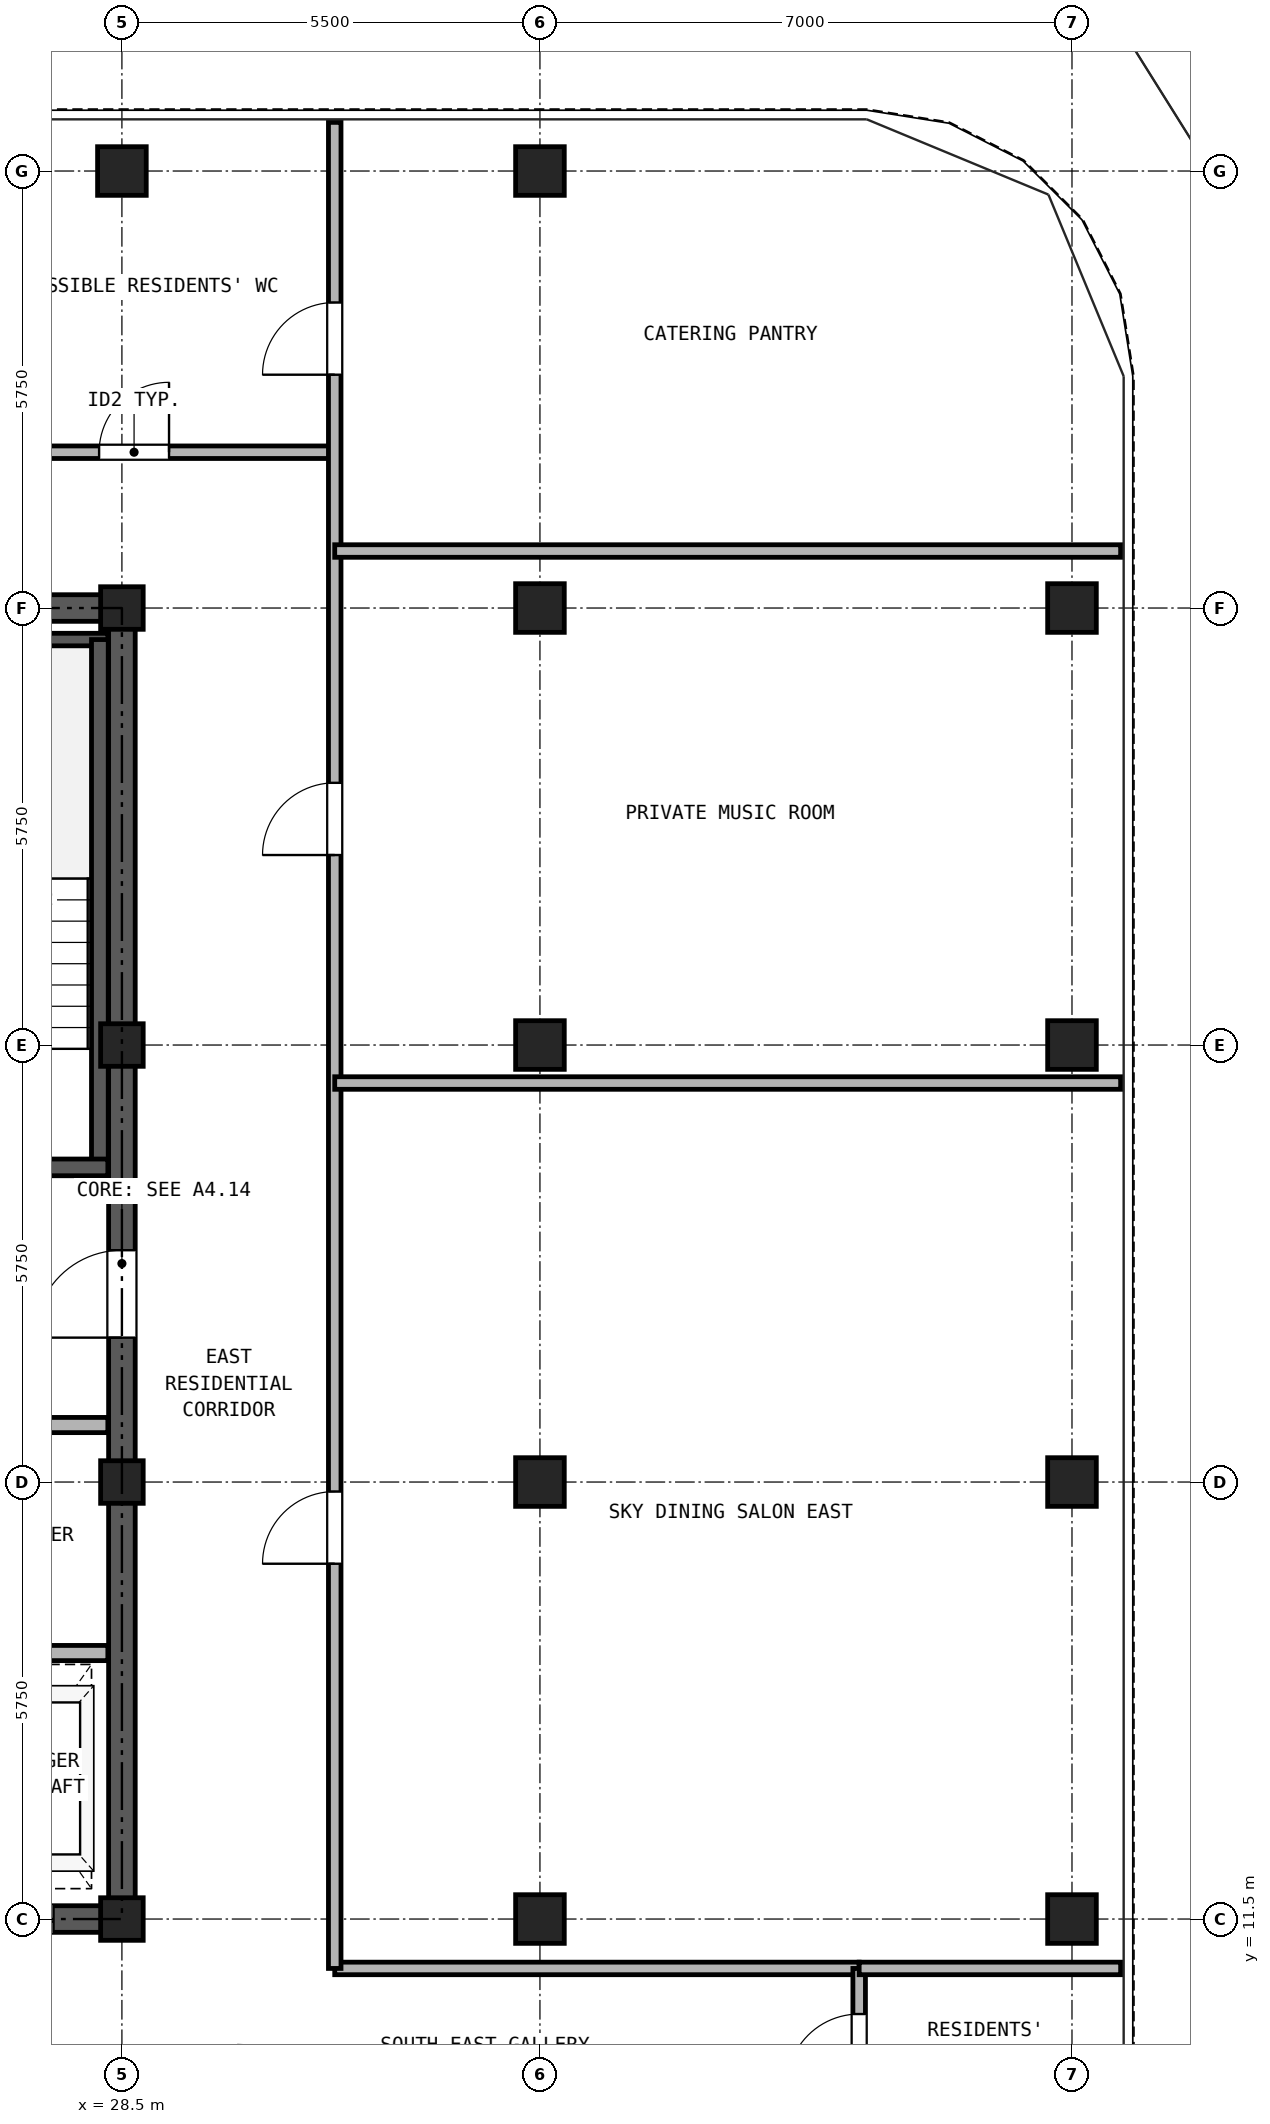
"""IFC4 building model, lengths in metres.
Left out: names, types, materials, properties, quantities, classifications, styles, units other than length and angle.
Written with IfcOpenShell. Run it as: python <this file> out.ifc"""

import sys

from ifc_helpers import new_model, si_unit, direction, frame, frame_2d, origin, origin_2d, place, context, subcontext, project, spatial, rectangle, hollow_rectangle, extrude, source, transform, mapped, element, fill, save


model = new_model("IFC4")
c1 = context("Model", 3, precision=1e-05, world=origin(), true_north=direction((0.0, 1.0)))
c2 = subcontext(c1, "Body", "Model", "MODEL_VIEW")
j1 = project(units=[si_unit("LENGTHUNIT", "METRE"), si_unit("PLANEANGLEUNIT", "RADIAN")], contexts=[c1])
p1 = place(None, origin())
s1 = spatial("IfcSite", under=j1, at=p1, CompositionType="ELEMENT")
p2 = place(p1, origin())
s2 = spatial("IfcBuilding", under=s1, at=p2, CompositionType="ELEMENT")
p3 = place(p2, frame((0.0, 0.0, 261.7)))
s3 = spatial("IfcBuildingStorey", under=s2, at=p3, CompositionType="ELEMENT", Elevation=261.7)
m1 = source(origin(), c2, "Body", "SweptSolid", [
    extrude(hollow_rectangle(XDim=0.64, YDim=0.64, WallThickness=0.035, at=origin_2d()), origin(), (0.0, 0.0, 1.0), 2.98),
])
for number, where, z_axis, x_axis in (
    (1, (28.5, 34.5, 0.0), (0.0, 0.0, 1.0), (1.0, 0.0, 0.0)),
    (2, (34.0, 34.5, 0.0), (0.0, 0.0, 1.0), (1.0, 0.0, 0.0)),
    (3, (41.0, 11.5, 0.0), (0.0, 0.0, 1.0), (1.0, 0.0, 0.0)),
    (4, (41.0, 17.25, 0.0), (0.0, 0.0, 1.0), (1.0, 0.0, 0.0)),
    (5, (41.0, 23.0, 0.0), (0.0, 0.0, 1.0), (1.0, 0.0, 0.0)),
    (6, (41.0, 28.75, 0.0), (0.0, 0.0, 1.0), (1.0, 0.0, 0.0)),
):
    element("IfcColumn", number, at=place(p3, frame(where, z_axis=z_axis, x_axis=x_axis)), inside=s3, PredefinedType="COLUMN", context=c2, shape_type="MappedRepresentation", body=[
        mapped(m1, transform((0.0, 0.0, 0.0), x_axis=(1.0, 0.0, 0.0), y_axis=(0.0, 1.0, 0.0), z_axis=(0.0, 0.0, 1.0), scale=1.0)),
    ])
m2 = source(origin(), c2, "Body", "SweptSolid", [
    extrude(hollow_rectangle(XDim=0.56, YDim=0.56, WallThickness=0.03, at=origin_2d()), origin(), (0.0, 0.0, 1.0), 2.98),
])
for number, where, z_axis, x_axis in (
    (7, (28.5, 11.5, 0.0), (0.0, 0.0, 1.0), (1.0, 0.0, 0.0)),
    (8, (28.5, 17.25, 0.0), (0.0, 0.0, 1.0), (1.0, 0.0, 0.0)),
    (9, (28.5, 23.0, 0.0), (0.0, 0.0, 1.0), (1.0, 0.0, 0.0)),
    (10, (28.5, 28.75, 0.0), (0.0, 0.0, 1.0), (1.0, 0.0, 0.0)),
):
    element("IfcColumn", number, at=place(p3, frame(where, z_axis=z_axis, x_axis=x_axis)), inside=s3, PredefinedType="COLUMN", context=c2, shape_type="MappedRepresentation", body=[
        mapped(m2, transform((0.0, 0.0, 0.0), x_axis=(1.0, 0.0, 0.0), y_axis=(0.0, 1.0, 0.0), z_axis=(0.0, 0.0, 1.0), scale=1.0)),
    ])
for number, where, z_axis, x_axis in (
    (11, (34.0, 11.5, 0.0), (0.0, 0.0, 1.0), (1.0, 0.0, 0.0)),
    (12, (34.0, 17.25, 0.0), (0.0, 0.0, 1.0), (1.0, 0.0, 0.0)),
    (13, (34.0, 23.0, 0.0), (0.0, 0.0, 1.0), (1.0, 0.0, 0.0)),
    (14, (34.0, 28.75, 0.0), (0.0, 0.0, 1.0), (1.0, 0.0, 0.0)),
):
    element("IfcColumn", number, at=place(p3, frame(where, z_axis=z_axis, x_axis=x_axis)), inside=s3, PredefinedType="COLUMN", context=c2, shape_type="MappedRepresentation", body=[
        mapped(m1, transform((0.0, 0.0, 0.0), x_axis=(1.0, 0.0, 0.0), y_axis=(0.0, 1.0, 0.0), z_axis=(0.0, 0.0, 1.0), scale=1.0)),
    ])
p4 = place(p3, frame((18.325, 11.5, 0.0), z_axis=(0.0, 0.0, 1.0), x_axis=(1.0, 0.0, 0.0)))
e15 = element("IfcWall", 15, at=p4, inside=s3, PredefinedType="SHEAR", context=c2, shape_type="SweptSolid", body=[
    extrude(rectangle(XDim=10.35, YDim=0.35, at=frame_2d((5.175, 0.0))), origin(), (0.0, 0.0, 1.0), 2.98),
])
p5 = place(p4, frame((1.775, 0.0, 0.0)))
e16 = element("IfcOpeningElement", 16, at=p5, cuts=e15, PredefinedType="OPENING", context=c2, shape_type="SweptSolid", body=[
    extrude(rectangle(XDim=0.95, YDim=2.15, at=frame_2d((0.475, 1.075))), frame((0.0, 0.185, 0.0), z_axis=(0.0, -1.0, 0.0), x_axis=(1.0, 0.0, 0.0)), (0.0, 0.0, 1.0), 0.37),
])
p6 = place(p4, frame((5.275, 0.0, 0.0)))
e17 = element("IfcOpeningElement", 17, at=p6, cuts=e15, PredefinedType="OPENING", context=c2, shape_type="SweptSolid", body=[
    extrude(rectangle(XDim=0.95, YDim=2.15, at=frame_2d((0.475, 1.075))), frame((0.0, 0.185, 0.0), z_axis=(0.0, -1.0, 0.0), x_axis=(1.0, 0.0, 0.0)), (0.0, 0.0, 1.0), 0.37),
])
p7 = place(p4, frame((8.175, 0.0, 0.0)))
e18 = element("IfcOpeningElement", 18, at=p7, cuts=e15, PredefinedType="OPENING", context=c2, shape_type="SweptSolid", body=[
    extrude(rectangle(XDim=1.1, YDim=2.25, at=frame_2d((0.55, 1.125))), frame((0.0, 0.185, 0.0), z_axis=(0.0, -1.0, 0.0), x_axis=(1.0, 0.0, 0.0)), (0.0, 0.0, 1.0), 0.37),
])
p8 = place(p3, frame((18.325, 28.75, 0.0), z_axis=(0.0, 0.0, 1.0), x_axis=(1.0, 0.0, 0.0)))
e19 = element("IfcWall", 19, at=p8, inside=s3, PredefinedType="SHEAR", context=c2, shape_type="SweptSolid", body=[
    extrude(rectangle(XDim=10.35, YDim=0.35, at=frame_2d((5.175, 0.0))), origin(), (0.0, 0.0, 1.0), 2.98),
])
p9 = place(p8, frame((4.055, 0.0, 0.0)))
e20 = element("IfcOpeningElement", 20, at=p9, cuts=e19, PredefinedType="OPENING", context=c2, shape_type="SweptSolid", body=[
    extrude(rectangle(XDim=0.9, YDim=2.05, at=frame_2d((0.45, 1.025))), frame((0.0, 0.185, 0.0), z_axis=(0.0, -1.0, 0.0), x_axis=(1.0, 0.0, 0.0)), (0.0, 0.0, 1.0), 0.37),
])
p10 = place(p8, frame((5.595, 0.0, 0.0)))
e21 = element("IfcOpeningElement", 21, at=p10, cuts=e19, PredefinedType="OPENING", context=c2, shape_type="SweptSolid", body=[
    extrude(rectangle(XDim=0.9, YDim=2.05, at=frame_2d((0.45, 1.025))), frame((0.0, 0.185, 0.0), z_axis=(0.0, -1.0, 0.0), x_axis=(1.0, 0.0, 0.0)), (0.0, 0.0, 1.0), 0.37),
])
p11 = place(p3, frame((28.5, 11.675, 0.0), z_axis=(0.0, 0.0, 1.0), x_axis=(0.0, 1.0, 0.0)))
e22 = element("IfcWall", 22, at=p11, inside=s3, PredefinedType="SHEAR", context=c2, shape_type="SweptSolid", body=[
    extrude(rectangle(XDim=16.9, YDim=0.35, at=frame_2d((8.45, 0.0))), origin(), (0.0, 0.0, 1.0), 2.98),
])
p12 = place(p11, frame((7.475, 0.0, 0.0)))
e23 = element("IfcOpeningElement", 23, at=p12, cuts=e22, PredefinedType="OPENING", context=c2, shape_type="SweptSolid", body=[
    extrude(rectangle(XDim=1.15, YDim=2.2, at=frame_2d((0.575, 1.1))), frame((0.0, 0.185, 0.0), z_axis=(0.0, -1.0, 0.0), x_axis=(1.0, 0.0, 0.0)), (0.0, 0.0, 1.0), 0.37),
])
p13 = place(p3, frame((25.13, 28.335, 0.0), z_axis=(0.0, 0.0, 1.0), x_axis=(1.0, 0.0, 0.0)))
e24 = element("IfcWall", 24, at=p13, inside=s3, PredefinedType="PARTITIONING", context=c2, shape_type="SweptSolid", body=[
    extrude(rectangle(XDim=3.185, YDim=0.165, at=frame_2d((1.593, 0.0))), origin(), (0.0, 0.0, 1.0), 2.98),
])
p14 = place(p3, frame((28.21, 21.39, 0.0), z_axis=(0.0, 0.0, 1.0), x_axis=(0.0, 1.0, 0.0)))
e25 = element("IfcWall", 25, at=p14, inside=s3, PredefinedType="SOLIDWALL", context=c2, shape_type="SweptSolid", body=[
    extrude(rectangle(XDim=6.945, YDim=0.22, at=frame_2d((3.473, 0.0))), origin(), (0.0, 0.0, 1.0), 2.98),
])
p15 = place(p3, frame((25.13, 21.39, 0.0), z_axis=(0.0, 0.0, 1.0), x_axis=(1.0, 0.0, 0.0)))
e26 = element("IfcWall", 26, at=p15, inside=s3, PredefinedType="SOLIDWALL", context=c2, shape_type="SweptSolid", body=[
    extrude(rectangle(XDim=3.185, YDim=0.22, at=frame_2d((1.593, 0.0))), origin(), (0.0, 0.0, 1.0), 2.98),
])
p16 = place(p15, frame((0.92, 0.0, 0.0)))
e27 = element("IfcOpeningElement", 27, at=p16, cuts=e26, PredefinedType="OPENING", context=c2, shape_type="SweptSolid", body=[
    extrude(rectangle(XDim=1.15, YDim=2.2, at=frame_2d((0.575, 1.1))), frame((0.0, 0.12, 0.0), z_axis=(0.0, -1.0, 0.0), x_axis=(1.0, 0.0, 0.0)), (0.0, 0.0, 1.0), 0.24),
])
p17 = place(p3, frame((18.685, 18.0, 0.0), z_axis=(0.0, 0.0, 1.0), x_axis=(1.0, 0.0, 0.0)))
e28 = element("IfcWall", 28, at=p17, inside=s3, PredefinedType="PARTITIONING", context=c2, shape_type="SweptSolid", body=[
    extrude(rectangle(XDim=9.63, YDim=0.2, at=frame_2d((4.815, 0.0))), origin(), (0.0, 0.0, 1.0), 2.98),
])
p18 = place(p17, frame((0.565, 0.0, 0.0)))
e29 = element("IfcOpeningElement", 29, at=p18, cuts=e28, PredefinedType="OPENING", context=c2, shape_type="SweptSolid", body=[
    extrude(rectangle(XDim=1.3, YDim=2.3, at=frame_2d((0.65, 1.15))), frame((0.0, 0.11, 0.0), z_axis=(0.0, -1.0, 0.0), x_axis=(1.0, 0.0, 0.0)), (0.0, 0.0, 1.0), 0.22),
])
p19 = place(p17, frame((2.665, 0.0, 0.0)))
e30 = element("IfcOpeningElement", 30, at=p19, cuts=e28, PredefinedType="OPENING", context=c2, shape_type="SweptSolid", body=[
    extrude(rectangle(XDim=1.3, YDim=2.3, at=frame_2d((0.65, 1.15))), frame((0.0, 0.11, 0.0), z_axis=(0.0, -1.0, 0.0), x_axis=(1.0, 0.0, 0.0)), (0.0, 0.0, 1.0), 0.22),
])
p20 = place(p17, frame((5.065, 0.0, 0.0)))
e31 = element("IfcOpeningElement", 31, at=p20, cuts=e28, PredefinedType="OPENING", context=c2, shape_type="SweptSolid", body=[
    extrude(rectangle(XDim=0.9, YDim=2.05, at=frame_2d((0.45, 1.025))), frame((0.0, 0.11, 0.0), z_axis=(0.0, -1.0, 0.0), x_axis=(1.0, 0.0, 0.0)), (0.0, 0.0, 1.0), 0.22),
])
p21 = place(p17, frame((7.765, 0.0, 0.0)))
e32 = element("IfcOpeningElement", 32, at=p21, cuts=e28, PredefinedType="OPENING", context=c2, shape_type="SweptSolid", body=[
    extrude(rectangle(XDim=0.9, YDim=2.05, at=frame_2d((0.45, 1.025))), frame((0.0, 0.11, 0.0), z_axis=(0.0, -1.0, 0.0), x_axis=(1.0, 0.0, 0.0)), (0.0, 0.0, 1.0), 0.22),
])
p22 = place(p3, frame((18.685, 15.0, 0.0), z_axis=(0.0, 0.0, 1.0), x_axis=(1.0, 0.0, 0.0)))
e33 = element("IfcWall", 33, at=p22, inside=s3, PredefinedType="PARTITIONING", context=c2, shape_type="SweptSolid", body=[
    extrude(rectangle(XDim=9.63, YDim=0.2, at=frame_2d((4.815, 0.0))), origin(), (0.0, 0.0, 1.0), 2.98),
])
p23 = place(p3, frame((31.3, 10.85, 0.0), z_axis=(0.0, 0.0, 1.0), x_axis=(1.0, 0.0, 0.0)))
e34 = element("IfcWall", 34, at=p23, inside=s3, PredefinedType="PARTITIONING", context=c2, shape_type="SweptSolid", body=[
    extrude(rectangle(XDim=6.9, YDim=0.165, at=frame_2d((3.45, 0.0))), origin(), (0.0, 0.0, 1.0), 2.98),
])
p24 = place(p3, frame((38.2, 8.85, 0.0), z_axis=(0.0, 0.0, 1.0), x_axis=(0.0, 1.0, 0.0)))
e35 = element("IfcWall", 35, at=p24, inside=s3, PredefinedType="PARTITIONING", context=c2, shape_type="SweptSolid", body=[
    extrude(rectangle(XDim=2.0, YDim=0.165, at=frame_2d((1.0, 0.0))), origin(), (0.0, 0.0, 1.0), 2.98),
])
p25 = place(p24, frame((0.45, 0.0, 0.0)))
e36 = element("IfcOpeningElement", 36, at=p25, cuts=e35, PredefinedType="OPENING", context=c2, shape_type="SweptSolid", body=[
    extrude(rectangle(XDim=0.95, YDim=2.15, at=frame_2d((0.475, 1.075))), frame((0.0, 0.093, 0.0), z_axis=(0.0, -1.0, 0.0), x_axis=(1.0, 0.0, 0.0)), (0.0, 0.0, 1.0), 0.185),
])
p26 = place(p3, frame((15.7, 30.8, 0.0), z_axis=(0.0, 0.0, 1.0), x_axis=(1.0, 0.0, 0.0)))
e37 = element("IfcWall", 37, at=p26, inside=s3, PredefinedType="PARTITIONING", context=c2, shape_type="SweptSolid", body=[
    extrude(rectangle(XDim=15.6, YDim=0.165, at=frame_2d((7.8, 0.0))), origin(), (0.0, 0.0, 1.0), 2.98),
])
p27 = place(p26, frame((2.65, 0.0, 0.0)))
e38 = element("IfcOpeningElement", 38, at=p27, cuts=e37, PredefinedType="OPENING", context=c2, shape_type="SweptSolid", body=[
    extrude(rectangle(XDim=0.95, YDim=2.15, at=frame_2d((0.475, 1.075))), frame((0.0, 0.093, 0.0), z_axis=(0.0, -1.0, 0.0), x_axis=(1.0, 0.0, 0.0)), (0.0, 0.0, 1.0), 0.185),
])
p28 = place(p26, frame((7.85, 0.0, 0.0)))
e39 = element("IfcOpeningElement", 39, at=p28, cuts=e37, PredefinedType="OPENING", context=c2, shape_type="SweptSolid", body=[
    extrude(rectangle(XDim=0.95, YDim=2.15, at=frame_2d((0.475, 1.075))), frame((0.0, 0.093, 0.0), z_axis=(0.0, -1.0, 0.0), x_axis=(1.0, 0.0, 0.0)), (0.0, 0.0, 1.0), 0.185),
])
p29 = place(p26, frame((12.5, 0.0, 0.0)))
e40 = element("IfcOpeningElement", 40, at=p29, cuts=e37, PredefinedType="OPENING", context=c2, shape_type="SweptSolid", body=[
    extrude(rectangle(XDim=0.92, YDim=2.1, at=frame_2d((0.46, 1.05))), frame((0.0, 0.093, 0.0), z_axis=(0.0, -1.0, 0.0), x_axis=(1.0, 0.0, 0.0)), (0.0, 0.0, 1.0), 0.185),
])
p30 = place(p3, frame((31.3, 10.85, 0.0), z_axis=(0.0, 0.0, 1.0), x_axis=(0.0, 1.0, 0.0)))
e41 = element("IfcWall", 41, at=p30, inside=s3, PredefinedType="PARTITIONING", context=c2, shape_type="SweptSolid", body=[
    extrude(rectangle(XDim=24.29, YDim=0.165, at=frame_2d((12.145, 0.0))), origin(), (0.0, 0.0, 1.0), 2.98),
])
p31 = place(p30, frame((5.325, 0.0, 0.0)))
e42 = element("IfcOpeningElement", 42, at=p31, cuts=e41, PredefinedType="OPENING", context=c2, shape_type="SweptSolid", body=[
    extrude(rectangle(XDim=0.95, YDim=2.15, at=frame_2d((0.475, 1.075))), frame((0.0, 0.093, 0.0), z_axis=(0.0, -1.0, 0.0), x_axis=(1.0, 0.0, 0.0)), (0.0, 0.0, 1.0), 0.185),
])
p32 = place(p30, frame((14.65, 0.0, 0.0)))
e43 = element("IfcOpeningElement", 43, at=p32, cuts=e41, PredefinedType="OPENING", context=c2, shape_type="SweptSolid", body=[
    extrude(rectangle(XDim=0.95, YDim=2.15, at=frame_2d((0.475, 1.075))), frame((0.0, 0.093, 0.0), z_axis=(0.0, -1.0, 0.0), x_axis=(1.0, 0.0, 0.0)), (0.0, 0.0, 1.0), 0.185),
])
p33 = place(p30, frame((20.97, 0.0, 0.0)))
e44 = element("IfcOpeningElement", 44, at=p33, cuts=e41, PredefinedType="OPENING", context=c2, shape_type="SweptSolid", body=[
    extrude(rectangle(XDim=0.95, YDim=2.15, at=frame_2d((0.475, 1.075))), frame((0.0, 0.093, 0.0), z_axis=(0.0, -1.0, 0.0), x_axis=(1.0, 0.0, 0.0)), (0.0, 0.0, 1.0), 0.185),
])
p34 = place(p3, frame((38.2, 10.85, 0.0), z_axis=(0.0, 0.0, 1.0), x_axis=(1.0, 0.0, 0.0)))
e45 = element("IfcWall", 45, at=p34, inside=s3, PredefinedType="PARTITIONING", context=c2, shape_type="SweptSolid", body=[
    extrude(rectangle(XDim=3.44, YDim=0.165, at=frame_2d((1.72, 0.0))), origin(), (0.0, 0.0, 1.0), 2.98),
])
for number, where, z_axis, x_axis in (
    (46, (31.3, 22.5, 0.0), (0.0, 0.0, 1.0), (1.0, 0.0, 0.0)),
    (47, (31.3, 29.5, 0.0), (0.0, 0.0, 1.0), (1.0, 0.0, 0.0)),
):
    element("IfcWall", number, at=place(p3, frame(where, z_axis=z_axis, x_axis=x_axis)), inside=s3, PredefinedType="PARTITIONING", context=c2, shape_type="SweptSolid", body=[
        extrude(rectangle(XDim=10.34, YDim=0.165, at=frame_2d((5.17, 0.0))), origin(), (0.0, 0.0, 1.0), 2.98),
    ])
p35 = place(p12, origin())
e48 = element("IfcDoor", 48, at=p35, inside=s3, OperationType="SINGLE_SWING_LEFT", PredefinedType="DOOR", context=c2, shape_type="SweptSolid", body=[
    extrude(rectangle(XDim=1.15, YDim=2.2, at=frame_2d((0.575, 1.1))), frame((0.0, 0.025, 0.0), z_axis=(0.0, -1.0, 0.0), x_axis=(1.0, 0.0, 0.0)), (0.0, 0.0, 1.0), 0.05),
])
fill(e23, e48)
p36 = place(p7, frame((1.1, 0.0, 0.0), z_axis=(0.0, 0.0, 1.0), x_axis=(-1.0, 0.0, 0.0)))
e49 = element("IfcDoor", 49, at=p36, inside=s3, OperationType="DOUBLE_DOOR_SLIDING", PredefinedType="DOOR", context=c2, shape_type="SweptSolid", body=[
    extrude(rectangle(XDim=1.1, YDim=2.25, at=frame_2d((0.55, 1.125))), frame((0.0, 0.025, 0.0), z_axis=(0.0, -1.0, 0.0), x_axis=(1.0, 0.0, 0.0)), (0.0, 0.0, 1.0), 0.05),
])
fill(e18, e49)
p37 = place(p25, origin())
e50 = element("IfcDoor", 50, at=p37, inside=s3, OperationType="SINGLE_SWING_LEFT", PredefinedType="DOOR", context=c2, shape_type="SweptSolid", body=[
    extrude(rectangle(XDim=0.95, YDim=2.15, at=frame_2d((0.475, 1.075))), frame((0.0, 0.025, 0.0), z_axis=(0.0, -1.0, 0.0), x_axis=(1.0, 0.0, 0.0)), (0.0, 0.0, 1.0), 0.05),
])
fill(e36, e50)
p38 = place(p31, origin())
e51 = element("IfcDoor", 51, at=p38, inside=s3, OperationType="SINGLE_SWING_LEFT", PredefinedType="DOOR", context=c2, shape_type="SweptSolid", body=[
    extrude(rectangle(XDim=0.95, YDim=2.15, at=frame_2d((0.475, 1.075))), frame((0.0, 0.025, 0.0), z_axis=(0.0, -1.0, 0.0), x_axis=(1.0, 0.0, 0.0)), (0.0, 0.0, 1.0), 0.05),
])
fill(e42, e51)
p39 = place(p32, origin())
e52 = element("IfcDoor", 52, at=p39, inside=s3, OperationType="SINGLE_SWING_LEFT", PredefinedType="DOOR", context=c2, shape_type="SweptSolid", body=[
    extrude(rectangle(XDim=0.95, YDim=2.15, at=frame_2d((0.475, 1.075))), frame((0.0, 0.025, 0.0), z_axis=(0.0, -1.0, 0.0), x_axis=(1.0, 0.0, 0.0)), (0.0, 0.0, 1.0), 0.05),
])
fill(e43, e52)
p40 = place(p33, origin())
e53 = element("IfcDoor", 53, at=p40, inside=s3, OperationType="SINGLE_SWING_LEFT", PredefinedType="DOOR", context=c2, shape_type="SweptSolid", body=[
    extrude(rectangle(XDim=0.95, YDim=2.15, at=frame_2d((0.475, 1.075))), frame((0.0, 0.025, 0.0), z_axis=(0.0, -1.0, 0.0), x_axis=(1.0, 0.0, 0.0)), (0.0, 0.0, 1.0), 0.05),
])
fill(e44, e53)
p41 = place(p29, origin())
e54 = element("IfcDoor", 54, at=p41, inside=s3, OperationType="SINGLE_SWING_RIGHT", PredefinedType="DOOR", context=c2, shape_type="SweptSolid", body=[
    extrude(rectangle(XDim=0.92, YDim=2.1, at=frame_2d((0.46, 1.05))), frame((0.0, 0.025, 0.0), z_axis=(0.0, -1.0, 0.0), x_axis=(1.0, 0.0, 0.0)), (0.0, 0.0, 1.0), 0.05),
])
fill(e40, e54)
save(model, sys.argv[1])
